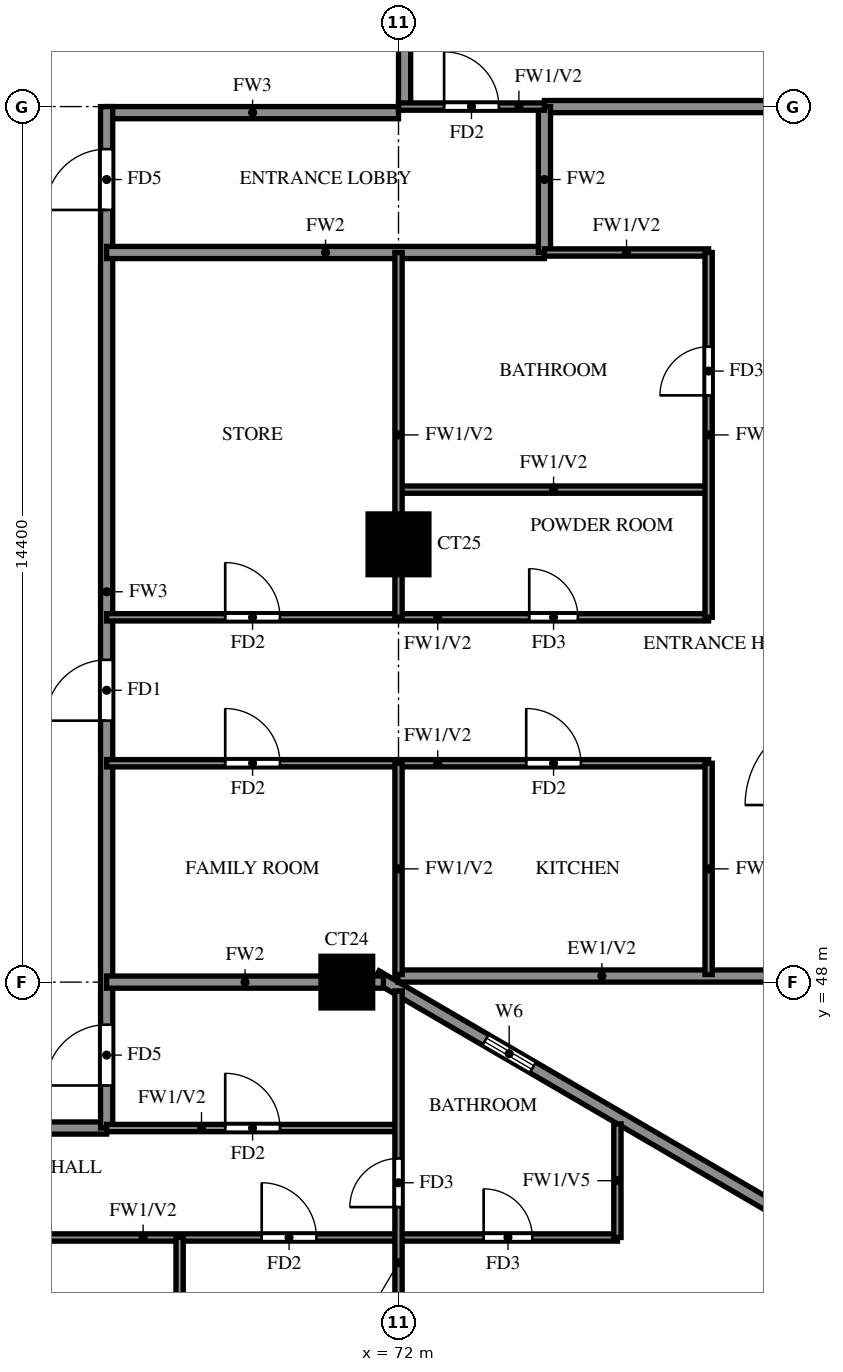
"""IFC4 building model, lengths in metres.
Left out: names, types, materials, properties, quantities, classifications, styles, units other than length and angle.
Written with IfcOpenShell. Run it as: python <this file> out.ifc"""

import sys

from ifc_helpers import new_model, si_unit, direction, frame, frame_2d, origin, origin_2d, place, context, subcontext, project, spatial, rectangle, extrude, source, transform, mapped, element, fill, save


model = new_model("IFC4")
c1 = context("Model", 3, precision=1e-05, world=origin(), true_north=direction((0.0, 1.0)))
c2 = subcontext(c1, "Body", "Model", "MODEL_VIEW")
j1 = project(units=[si_unit("LENGTHUNIT", "METRE"), si_unit("PLANEANGLEUNIT", "RADIAN")], contexts=[c1])
p1 = place(None, origin())
s1 = spatial("IfcSite", under=j1, at=p1, CompositionType="ELEMENT")
p2 = place(p1, origin())
s2 = spatial("IfcBuilding", under=s1, at=p2, CompositionType="ELEMENT")
p3 = place(p2, frame((0.0, 0.0, 171.0)))
s3 = spatial("IfcBuildingStorey", under=s2, at=p3, CompositionType="ELEMENT", Elevation=171.0)
m1 = source(origin(), c2, "Body", "SweptSolid", [
    extrude(rectangle(XDim=0.85, YDim=0.85, at=origin_2d()), origin(), (0.0, 0.0, 1.0), 3.2),
])
p4 = place(p3, frame((71.15, 48.0, 0.0), z_axis=(0.0, 0.0, 1.0), x_axis=(1.0, 0.0, 0.0)))
e1 = element("IfcColumn", 1, at=p4, inside=s3, PredefinedType="COLUMN", context=c2, shape_type="MappedRepresentation", body=[
    mapped(m1, transform((0.0, 0.0, 0.0))),
])
m2 = source(origin(), c2, "Body", "SweptSolid", [
    extrude(rectangle(XDim=1.0, YDim=1.0, at=origin_2d()), origin(), (0.0, 0.0, 1.0), 3.2),
])
p5 = place(p3, frame((72.0, 55.2, 0.0), z_axis=(0.0, 0.0, 1.0), x_axis=(1.0, 0.0, 0.0)))
e2 = element("IfcColumn", 2, at=p5, inside=s3, PredefinedType="COLUMN", context=c2, shape_type="MappedRepresentation", body=[
    mapped(m2, transform((0.0, 0.0, 0.0))),
])
p6 = place(p3, frame((85.719, 39.881, 0.0), z_axis=(0.0, 0.0, 1.0), x_axis=(-0.86377618652, 0.503875678716, 0.0)))
e3 = element("IfcWall", 3, at=p6, inside=s3, PredefinedType="SOLIDWALL", context=c2, shape_type="SweptSolid", body=[
    extrude(rectangle(XDim=16.311, YDim=0.2, at=frame_2d((8.156, 0.0))), origin(), (0.0, 0.0, 1.0), 3.2),
])
p7 = place(p6, frame((13.326, 0.0, 1.5)))
e4 = element("IfcOpeningElement", 4, at=p7, cuts=e3, PredefinedType="OPENING", context=c2, shape_type="SweptSolid", body=[
    extrude(rectangle(XDim=0.9, YDim=0.9, at=frame_2d((0.45, 0.45))), frame((0.0, 0.11, 0.0), z_axis=(0.0, -1.0, 0.0), x_axis=(1.0, 0.0, 0.0)), (0.0, 0.0, 1.0), 0.22),
])
p8 = place(p3, frame((71.99, 48.1, 0.0), z_axis=(0.0, 0.0, 1.0), x_axis=(1.0, 0.0, 0.0)))
e5 = element("IfcWall", 5, at=p8, inside=s3, PredefinedType="SOLIDWALL", context=c2, shape_type="SweptSolid", body=[
    extrude(rectangle(XDim=6.71, YDim=0.2, at=frame_2d((3.355, 0.0))), origin(), (0.0, 0.0, 1.0), 3.2),
])
p9 = place(p3, frame((60.0, 45.6, 0.0), z_axis=(0.0, 0.0, 1.0), x_axis=(1.0, 0.0, 0.0)))
e6 = element("IfcWall", 6, at=p9, inside=s3, PredefinedType="SOLIDWALL", context=c2, shape_type="SweptSolid", body=[
    extrude(rectangle(XDim=7.2, YDim=0.2, at=frame_2d((3.6, 0.0))), origin(), (0.0, 0.0, 1.0), 3.2),
])
p10 = place(p3, frame((67.2, 62.3, 0.0), z_axis=(0.0, 0.0, 1.0), x_axis=(1.0, 0.0, 0.0)))
e7 = element("IfcWall", 7, at=p10, inside=s3, PredefinedType="SOLIDWALL", context=c2, shape_type="SweptSolid", body=[
    extrude(rectangle(XDim=4.8, YDim=0.2, at=frame_2d((2.4, 0.0))), origin(), (0.0, 0.0, 1.0), 3.2),
])
p11 = place(p3, frame((67.2, 45.6, 0.0), z_axis=(0.0, 0.0, 1.0), x_axis=(0.0, 1.0, 0.0)))
e8 = element("IfcWall", 8, at=p11, inside=s3, PredefinedType="SOLIDWALL", context=c2, shape_type="SweptSolid", body=[
    extrude(rectangle(XDim=16.8, YDim=0.2, at=frame_2d((8.4, 0.0))), origin(), (0.0, 0.0, 1.0), 3.2),
])
p12 = place(p11, frame((6.7, 0.0, 0.0)))
e9 = element("IfcOpeningElement", 9, at=p12, cuts=e8, PredefinedType="OPENING", context=c2, shape_type="SweptSolid", body=[
    extrude(rectangle(XDim=1.0, YDim=2.1, at=frame_2d((0.5, 1.05))), frame((0.0, 0.11, 0.0), z_axis=(0.0, -1.0, 0.0), x_axis=(1.0, 0.0, 0.0)), (0.0, 0.0, 1.0), 0.22),
])
p13 = place(p11, frame((15.1, 0.0, 0.0)))
e10 = element("IfcOpeningElement", 10, at=p13, cuts=e8, PredefinedType="OPENING", context=c2, shape_type="SweptSolid", body=[
    extrude(rectangle(XDim=1.0, YDim=2.1, at=frame_2d((0.5, 1.05))), frame((0.0, 0.11, 0.0), z_axis=(0.0, -1.0, 0.0), x_axis=(1.0, 0.0, 0.0)), (0.0, 0.0, 1.0), 0.22),
])
p14 = place(p11, frame((0.7, 0.0, 0.0)))
e11 = element("IfcOpeningElement", 11, at=p14, cuts=e8, PredefinedType="OPENING", context=c2, shape_type="SweptSolid", body=[
    extrude(rectangle(XDim=1.0, YDim=2.1, at=frame_2d((0.5, 1.05))), frame((0.0, 0.11, 0.0), z_axis=(0.0, -1.0, 0.0), x_axis=(1.0, 0.0, 0.0)), (0.0, 0.0, 1.0), 0.22),
])
p15 = place(p3, frame((72.1, 62.4, 0.0), z_axis=(0.0, 0.0, 1.0), x_axis=(0.0, 1.0, 0.0)))
e12 = element("IfcWall", 12, at=p15, inside=s3, PredefinedType="SOLIDWALL", context=c2, shape_type="SweptSolid", body=[
    extrude(rectangle(XDim=15.6, YDim=0.2, at=frame_2d((7.8, 0.0))), origin(), (0.0, 0.0, 1.0), 3.2),
])
p16 = place(p3, frame((67.2, 48.0, 0.0), z_axis=(0.0, 0.0, 1.0), x_axis=(1.0, 0.0, 0.0)))
e13 = element("IfcWall", 13, at=p16, inside=s3, PredefinedType="SOLIDWALL", context=c2, shape_type="SweptSolid", body=[
    extrude(rectangle(XDim=4.552, YDim=0.2, at=frame_2d((2.276, 0.0))), origin(), (0.0, 0.0, 1.0), 3.2),
])
p17 = place(p3, frame((67.2, 60.0, 0.0), z_axis=(0.0, 0.0, 1.0), x_axis=(1.0, 0.0, 0.0)))
e14 = element("IfcWall", 14, at=p17, inside=s3, PredefinedType="SOLIDWALL", context=c2, shape_type="SweptSolid", body=[
    extrude(rectangle(XDim=7.2, YDim=0.2, at=frame_2d((3.6, 0.0))), origin(), (0.0, 0.0, 1.0), 3.2),
])
p18 = place(p3, frame((74.4, 62.4, 0.0), z_axis=(0.0, 0.0, 1.0), x_axis=(1.0, 0.0, 0.0)))
e15 = element("IfcWall", 15, at=p18, inside=s3, PredefinedType="SOLIDWALL", context=c2, shape_type="SweptSolid", body=[
    extrude(rectangle(XDim=11.875, YDim=0.2, at=frame_2d((5.938, 0.0))), origin(), (0.0, 0.0, 1.0), 3.2),
])
p19 = place(p3, frame((74.4, 60.0, 0.0), z_axis=(0.0, 0.0, 1.0), x_axis=(0.0, 1.0, 0.0)))
e16 = element("IfcWall", 16, at=p19, inside=s3, PredefinedType="SOLIDWALL", context=c2, shape_type="SweptSolid", body=[
    extrude(rectangle(XDim=2.4, YDim=0.2, at=frame_2d((1.2, 0.0))), origin(), (0.0, 0.0, 1.0), 3.2),
])
p20 = place(p3, frame((60.0, 43.8, 0.0), z_axis=(0.0, 0.0, 1.0), x_axis=(1.0, 0.0, 0.0)))
e17 = element("IfcWall", 17, at=p20, inside=s3, PredefinedType="PARTITIONING", context=c2, shape_type="SweptSolid", body=[
    extrude(rectangle(XDim=15.6, YDim=0.12, at=frame_2d((7.8, 0.0))), origin(), (0.0, 0.0, 1.0), 3.2),
])
p21 = place(p20, frame((9.75, 0.0, 0.0)))
e18 = element("IfcOpeningElement", 18, at=p21, cuts=e17, PredefinedType="OPENING", context=c2, shape_type="SweptSolid", body=[
    extrude(rectangle(XDim=0.9, YDim=2.1, at=frame_2d((0.45, 1.05))), frame((0.0, 0.07, 0.0), z_axis=(0.0, -1.0, 0.0), x_axis=(1.0, 0.0, 0.0)), (0.0, 0.0, 1.0), 0.14),
])
p22 = place(p20, frame((3.45, 0.0, 0.0)))
e19 = element("IfcOpeningElement", 19, at=p22, cuts=e17, PredefinedType="OPENING", context=c2, shape_type="SweptSolid", body=[
    extrude(rectangle(XDim=1.5, YDim=2.1, at=frame_2d((0.75, 1.05))), frame((0.0, 0.07, 0.0), z_axis=(0.0, -1.0, 0.0), x_axis=(1.0, 0.0, 0.0)), (0.0, 0.0, 1.0), 0.14),
])
p23 = place(p20, frame((13.4, 0.0, 0.0)))
e20 = element("IfcOpeningElement", 20, at=p23, cuts=e17, PredefinedType="OPENING", context=c2, shape_type="SweptSolid", body=[
    extrude(rectangle(XDim=0.8, YDim=2.1, at=frame_2d((0.4, 1.05))), frame((0.0, 0.07, 0.0), z_axis=(0.0, -1.0, 0.0), x_axis=(1.0, 0.0, 0.0)), (0.0, 0.0, 1.0), 0.14),
])
p24 = place(p3, frame((67.2, 45.6, 0.0), z_axis=(0.0, 0.0, 1.0), x_axis=(1.0, 0.0, 0.0)))
e21 = element("IfcWall", 21, at=p24, inside=s3, PredefinedType="PARTITIONING", context=c2, shape_type="SweptSolid", body=[
    extrude(rectangle(XDim=4.8, YDim=0.12, at=frame_2d((2.4, 0.0))), origin(), (0.0, 0.0, 1.0), 3.2),
])
p25 = place(p24, frame((1.95, 0.0, 0.0)))
e22 = element("IfcOpeningElement", 22, at=p25, cuts=e21, PredefinedType="OPENING", context=c2, shape_type="SweptSolid", body=[
    extrude(rectangle(XDim=0.9, YDim=2.1, at=frame_2d((0.45, 1.05))), frame((0.0, 0.07, 0.0), z_axis=(0.0, -1.0, 0.0), x_axis=(1.0, 0.0, 0.0)), (0.0, 0.0, 1.0), 0.14),
])
p26 = place(p3, frame((67.2, 51.6, 0.0), z_axis=(0.0, 0.0, 1.0), x_axis=(1.0, 0.0, 0.0)))
e23 = element("IfcWall", 23, at=p26, inside=s3, PredefinedType="PARTITIONING", context=c2, shape_type="SweptSolid", body=[
    extrude(rectangle(XDim=9.9, YDim=0.12, at=frame_2d((4.95, 0.0))), origin(), (0.0, 0.0, 1.0), 3.2),
])
p27 = place(p26, frame((6.9, 0.0, 0.0)))
e24 = element("IfcOpeningElement", 24, at=p27, cuts=e23, PredefinedType="OPENING", context=c2, shape_type="SweptSolid", body=[
    extrude(rectangle(XDim=0.9, YDim=2.1, at=frame_2d((0.45, 1.05))), frame((0.0, 0.07, 0.0), z_axis=(0.0, -1.0, 0.0), x_axis=(1.0, 0.0, 0.0)), (0.0, 0.0, 1.0), 0.14),
])
p28 = place(p26, frame((1.95, 0.0, 0.0)))
e25 = element("IfcOpeningElement", 25, at=p28, cuts=e23, PredefinedType="OPENING", context=c2, shape_type="SweptSolid", body=[
    extrude(rectangle(XDim=0.9, YDim=2.1, at=frame_2d((0.45, 1.05))), frame((0.0, 0.07, 0.0), z_axis=(0.0, -1.0, 0.0), x_axis=(1.0, 0.0, 0.0)), (0.0, 0.0, 1.0), 0.14),
])
p29 = place(p3, frame((67.2, 54.0, 0.0), z_axis=(0.0, 0.0, 1.0), x_axis=(1.0, 0.0, 0.0)))
e26 = element("IfcWall", 26, at=p29, inside=s3, PredefinedType="PARTITIONING", context=c2, shape_type="SweptSolid", body=[
    extrude(rectangle(XDim=9.9, YDim=0.12, at=frame_2d((4.95, 0.0))), origin(), (0.0, 0.0, 1.0), 3.2),
])
p30 = place(p29, frame((6.95, 0.0, 0.0)))
e27 = element("IfcOpeningElement", 27, at=p30, cuts=e26, PredefinedType="OPENING", context=c2, shape_type="SweptSolid", body=[
    extrude(rectangle(XDim=0.8, YDim=2.1, at=frame_2d((0.4, 1.05))), frame((0.0, 0.07, 0.0), z_axis=(0.0, -1.0, 0.0), x_axis=(1.0, 0.0, 0.0)), (0.0, 0.0, 1.0), 0.14),
])
p31 = place(p29, frame((1.95, 0.0, 0.0)))
e28 = element("IfcOpeningElement", 28, at=p31, cuts=e26, PredefinedType="OPENING", context=c2, shape_type="SweptSolid", body=[
    extrude(rectangle(XDim=0.9, YDim=2.1, at=frame_2d((0.45, 1.05))), frame((0.0, 0.07, 0.0), z_axis=(0.0, -1.0, 0.0), x_axis=(1.0, 0.0, 0.0)), (0.0, 0.0, 1.0), 0.14),
])
p32 = place(p3, frame((72.0, 56.1, 0.0), z_axis=(0.0, 0.0, 1.0), x_axis=(1.0, 0.0, 0.0)))
e29 = element("IfcWall", 29, at=p32, inside=s3, PredefinedType="PARTITIONING", context=c2, shape_type="SweptSolid", body=[
    extrude(rectangle(XDim=5.1, YDim=0.12, at=frame_2d((2.55, 0.0))), origin(), (0.0, 0.0, 1.0), 3.2),
])
p33 = place(p3, frame((74.4, 60.0, 0.0), z_axis=(0.0, 0.0, 1.0), x_axis=(1.0, 0.0, 0.0)))
e30 = element("IfcWall", 30, at=p33, inside=s3, PredefinedType="PARTITIONING", context=c2, shape_type="SweptSolid", body=[
    extrude(rectangle(XDim=2.7, YDim=0.12, at=frame_2d((1.35, 0.0))), origin(), (0.0, 0.0, 1.0), 3.2),
])
p34 = place(p3, frame((72.0, 62.4, 0.0), z_axis=(0.0, 0.0, 1.0), x_axis=(1.0, 0.0, 0.0)))
e31 = element("IfcWall", 31, at=p34, inside=s3, PredefinedType="PARTITIONING", context=c2, shape_type="SweptSolid", body=[
    extrude(rectangle(XDim=2.4, YDim=0.12, at=frame_2d((1.2, 0.0))), origin(), (0.0, 0.0, 1.0), 3.2),
])
p35 = place(p34, frame((0.75, 0.0, 0.0)))
e32 = element("IfcOpeningElement", 32, at=p35, cuts=e31, PredefinedType="OPENING", context=c2, shape_type="SweptSolid", body=[
    extrude(rectangle(XDim=0.9, YDim=2.1, at=frame_2d((0.45, 1.05))), frame((0.0, 0.07, 0.0), z_axis=(0.0, -1.0, 0.0), x_axis=(1.0, 0.0, 0.0)), (0.0, 0.0, 1.0), 0.14),
])
p36 = place(p3, frame((68.4, 39.725, 0.0), z_axis=(0.0, 0.0, 1.0), x_axis=(0.0, 1.0, 0.0)))
e33 = element("IfcWall", 33, at=p36, inside=s3, PredefinedType="PARTITIONING", context=c2, shape_type="SweptSolid", body=[
    extrude(rectangle(XDim=4.075, YDim=0.12, at=frame_2d((2.038, 0.0))), origin(), (0.0, 0.0, 1.0), 3.2),
])
p37 = place(p36, frame((1.288, 0.0, 0.0)))
e34 = element("IfcOpeningElement", 34, at=p37, cuts=e33, PredefinedType="OPENING", context=c2, shape_type="SweptSolid", body=[
    extrude(rectangle(XDim=1.5, YDim=2.1, at=frame_2d((0.75, 1.05))), frame((0.0, 0.07, 0.0), z_axis=(0.0, -1.0, 0.0), x_axis=(1.0, 0.0, 0.0)), (0.0, 0.0, 1.0), 0.14),
])
p38 = place(p3, frame((72.0, 39.725, 0.0), z_axis=(0.0, 0.0, 1.0), x_axis=(0.0, 1.0, 0.0)))
e35 = element("IfcWall", 35, at=p38, inside=s3, PredefinedType="PARTITIONING", context=c2, shape_type="SweptSolid", body=[
    extrude(rectangle(XDim=8.13, YDim=0.12, at=frame_2d((4.065, 0.0))), origin(), (0.0, 0.0, 1.0), 2.3),
])
p39 = place(p38, frame((1.788, 0.0, 0.0)))
e36 = element("IfcOpeningElement", 36, at=p39, cuts=e35, PredefinedType="OPENING", context=c2, shape_type="SweptSolid", body=[
    extrude(rectangle(XDim=0.9, YDim=2.1, at=frame_2d((0.45, 1.05))), frame((0.0, 0.07, 0.0), z_axis=(0.0, -1.0, 0.0), x_axis=(1.0, 0.0, 0.0)), (0.0, 0.0, 1.0), 0.14),
])
p40 = place(p38, frame((4.575, 0.0, 0.0)))
e37 = element("IfcOpeningElement", 37, at=p40, cuts=e35, PredefinedType="OPENING", context=c2, shape_type="SweptSolid", body=[
    extrude(rectangle(XDim=0.8, YDim=2.1, at=frame_2d((0.4, 1.05))), frame((0.0, 0.07, 0.0), z_axis=(0.0, -1.0, 0.0), x_axis=(1.0, 0.0, 0.0)), (0.0, 0.0, 1.0), 0.14),
])
p41 = place(p3, frame((72.0, 48.125, 0.0), z_axis=(0.0, 0.0, 1.0), x_axis=(0.0, 1.0, 0.0)))
e38 = element("IfcWall", 38, at=p41, inside=s3, PredefinedType="PARTITIONING", context=c2, shape_type="SweptSolid", body=[
    extrude(rectangle(XDim=3.475, YDim=0.12, at=frame_2d((1.738, 0.0))), origin(), (0.0, 0.0, 1.0), 3.2),
])
p42 = place(p3, frame((72.0, 54.0, 0.0), z_axis=(0.0, 0.0, 1.0), x_axis=(0.0, 1.0, 0.0)))
e39 = element("IfcWall", 39, at=p42, inside=s3, PredefinedType="PARTITIONING", context=c2, shape_type="SweptSolid", body=[
    extrude(rectangle(XDim=6.0, YDim=0.12, at=frame_2d((3.0, 0.0))), origin(), (0.0, 0.0, 1.0), 3.2),
])
p43 = place(p3, frame((75.6, 43.8, 0.0), z_axis=(0.0, 0.0, 1.0), x_axis=(0.0, 1.0, 0.0)))
e40 = element("IfcWall", 40, at=p43, inside=s3, PredefinedType="PARTITIONING", context=c2, shape_type="SweptSolid", body=[
    extrude(rectangle(XDim=1.868, YDim=0.12, at=frame_2d((0.934, 0.0))), origin(), (0.0, 0.0, 1.0), 2.3),
])
p44 = place(p3, frame((77.1, 48.125, 0.0), z_axis=(0.0, 0.0, 1.0), x_axis=(0.0, 1.0, 0.0)))
e41 = element("IfcWall", 41, at=p44, inside=s3, PredefinedType="PARTITIONING", context=c2, shape_type="SweptSolid", body=[
    extrude(rectangle(XDim=3.475, YDim=0.12, at=frame_2d((1.738, 0.0))), origin(), (0.0, 0.0, 1.0), 3.2),
])
p45 = place(p3, frame((77.1, 54.0, 0.0), z_axis=(0.0, 0.0, 1.0), x_axis=(0.0, 1.0, 0.0)))
e42 = element("IfcWall", 42, at=p45, inside=s3, PredefinedType="PARTITIONING", context=c2, shape_type="SweptSolid", body=[
    extrude(rectangle(XDim=6.0, YDim=0.12, at=frame_2d((3.0, 0.0))), origin(), (0.0, 0.0, 1.0), 3.2),
])
p46 = place(p45, frame((3.65, 0.0, 0.0)))
e43 = element("IfcOpeningElement", 43, at=p46, cuts=e42, PredefinedType="OPENING", context=c2, shape_type="SweptSolid", body=[
    extrude(rectangle(XDim=0.8, YDim=2.1, at=frame_2d((0.4, 1.05))), frame((0.0, 0.07, 0.0), z_axis=(0.0, -1.0, 0.0), x_axis=(1.0, 0.0, 0.0)), (0.0, 0.0, 1.0), 0.14),
])
p47 = place(p7, origin())
e44 = element("IfcWindow", 44, at=p47, inside=s3, PartitioningType="SINGLE_PANEL", PredefinedType="WINDOW", context=c2, shape_type="SweptSolid", body=[
    extrude(rectangle(XDim=0.9, YDim=0.9, at=frame_2d((0.45, 0.45))), frame((0.0, 0.03, 0.0), z_axis=(0.0, -1.0, 0.0), x_axis=(1.0, 0.0, 0.0)), (0.0, 0.0, 1.0), 0.06),
])
fill(e4, e44)
p48 = place(p12, origin())
e45 = element("IfcDoor", 45, at=p48, inside=s3, OperationType="SINGLE_SWING_RIGHT", PredefinedType="DOOR", context=c2, shape_type="SweptSolid", body=[
    extrude(rectangle(XDim=1.0, YDim=2.1, at=frame_2d((0.5, 1.05))), frame((0.0, 0.025, 0.0), z_axis=(0.0, -1.0, 0.0), x_axis=(1.0, 0.0, 0.0)), (0.0, 0.0, 1.0), 0.05),
])
fill(e9, e45)
p49 = place(p27, origin())
e46 = element("IfcDoor", 46, at=p49, inside=s3, OperationType="SINGLE_SWING_LEFT", PredefinedType="DOOR", context=c2, shape_type="SweptSolid", body=[
    extrude(rectangle(XDim=0.9, YDim=2.1, at=frame_2d((0.45, 1.05))), frame((0.0, 0.025, 0.0), z_axis=(0.0, -1.0, 0.0), x_axis=(1.0, 0.0, 0.0)), (0.0, 0.0, 1.0), 0.05),
])
fill(e24, e46)
p50 = place(p30, origin())
e47 = element("IfcDoor", 47, at=p50, inside=s3, OperationType="SINGLE_SWING_LEFT", PredefinedType="DOOR", context=c2, shape_type="SweptSolid", body=[
    extrude(rectangle(XDim=0.8, YDim=2.1, at=frame_2d((0.4, 1.05))), frame((0.0, 0.025, 0.0), z_axis=(0.0, -1.0, 0.0), x_axis=(1.0, 0.0, 0.0)), (0.0, 0.0, 1.0), 0.05),
])
fill(e27, e47)
p51 = place(p46, origin())
e48 = element("IfcDoor", 48, at=p51, inside=s3, OperationType="SINGLE_SWING_RIGHT", PredefinedType="DOOR", context=c2, shape_type="SweptSolid", body=[
    extrude(rectangle(XDim=0.8, YDim=2.1, at=frame_2d((0.4, 1.05))), frame((0.0, 0.025, 0.0), z_axis=(0.0, -1.0, 0.0), x_axis=(1.0, 0.0, 0.0)), (0.0, 0.0, 1.0), 0.05),
])
fill(e43, e48)
p52 = place(p28, origin())
e49 = element("IfcDoor", 49, at=p52, inside=s3, OperationType="SINGLE_SWING_LEFT", PredefinedType="DOOR", context=c2, shape_type="SweptSolid", body=[
    extrude(rectangle(XDim=0.9, YDim=2.1, at=frame_2d((0.45, 1.05))), frame((0.0, 0.025, 0.0), z_axis=(0.0, -1.0, 0.0), x_axis=(1.0, 0.0, 0.0)), (0.0, 0.0, 1.0), 0.05),
])
fill(e25, e49)
p53 = place(p31, origin())
e50 = element("IfcDoor", 50, at=p53, inside=s3, OperationType="SINGLE_SWING_LEFT", PredefinedType="DOOR", context=c2, shape_type="SweptSolid", body=[
    extrude(rectangle(XDim=0.9, YDim=2.1, at=frame_2d((0.45, 1.05))), frame((0.0, 0.025, 0.0), z_axis=(0.0, -1.0, 0.0), x_axis=(1.0, 0.0, 0.0)), (0.0, 0.0, 1.0), 0.05),
])
fill(e28, e50)
p54 = place(p35, origin())
e51 = element("IfcDoor", 51, at=p54, inside=s3, OperationType="SINGLE_SWING_LEFT", PredefinedType="DOOR", context=c2, shape_type="SweptSolid", body=[
    extrude(rectangle(XDim=0.9, YDim=2.1, at=frame_2d((0.45, 1.05))), frame((0.0, 0.025, 0.0), z_axis=(0.0, -1.0, 0.0), x_axis=(1.0, 0.0, 0.0)), (0.0, 0.0, 1.0), 0.05),
])
fill(e32, e51)
p55 = place(p13, origin())
e52 = element("IfcDoor", 52, at=p55, inside=s3, OperationType="SINGLE_SWING_RIGHT", PredefinedType="DOOR", context=c2, shape_type="SweptSolid", body=[
    extrude(rectangle(XDim=1.0, YDim=2.1, at=frame_2d((0.5, 1.05))), frame((0.0, 0.025, 0.0), z_axis=(0.0, -1.0, 0.0), x_axis=(1.0, 0.0, 0.0)), (0.0, 0.0, 1.0), 0.05),
])
fill(e10, e52)
p56 = place(p25, origin())
e53 = element("IfcDoor", 53, at=p56, inside=s3, OperationType="SINGLE_SWING_LEFT", PredefinedType="DOOR", context=c2, shape_type="SweptSolid", body=[
    extrude(rectangle(XDim=0.9, YDim=2.1, at=frame_2d((0.45, 1.05))), frame((0.0, 0.025, 0.0), z_axis=(0.0, -1.0, 0.0), x_axis=(1.0, 0.0, 0.0)), (0.0, 0.0, 1.0), 0.05),
])
fill(e22, e53)
p57 = place(p14, origin())
e54 = element("IfcDoor", 54, at=p57, inside=s3, OperationType="SINGLE_SWING_RIGHT", PredefinedType="DOOR", context=c2, shape_type="SweptSolid", body=[
    extrude(rectangle(XDim=1.0, YDim=2.1, at=frame_2d((0.5, 1.05))), frame((0.0, 0.025, 0.0), z_axis=(0.0, -1.0, 0.0), x_axis=(1.0, 0.0, 0.0)), (0.0, 0.0, 1.0), 0.05),
])
fill(e11, e54)
p58 = place(p21, origin())
e55 = element("IfcDoor", 55, at=p58, inside=s3, OperationType="SINGLE_SWING_LEFT", PredefinedType="DOOR", context=c2, shape_type="SweptSolid", body=[
    extrude(rectangle(XDim=0.9, YDim=2.1, at=frame_2d((0.45, 1.05))), frame((0.0, 0.025, 0.0), z_axis=(0.0, -1.0, 0.0), x_axis=(1.0, 0.0, 0.0)), (0.0, 0.0, 1.0), 0.05),
])
fill(e18, e55)
p59 = place(p40, origin())
e56 = element("IfcDoor", 56, at=p59, inside=s3, OperationType="SINGLE_SWING_LEFT", PredefinedType="DOOR", context=c2, shape_type="SweptSolid", body=[
    extrude(rectangle(XDim=0.8, YDim=2.1, at=frame_2d((0.4, 1.05))), frame((0.0, 0.025, 0.0), z_axis=(0.0, -1.0, 0.0), x_axis=(1.0, 0.0, 0.0)), (0.0, 0.0, 1.0), 0.05),
])
fill(e37, e56)
p60 = place(p23, origin())
e57 = element("IfcDoor", 57, at=p60, inside=s3, OperationType="SINGLE_SWING_LEFT", PredefinedType="DOOR", context=c2, shape_type="SweptSolid", body=[
    extrude(rectangle(XDim=0.8, YDim=2.1, at=frame_2d((0.4, 1.05))), frame((0.0, 0.025, 0.0), z_axis=(0.0, -1.0, 0.0), x_axis=(1.0, 0.0, 0.0)), (0.0, 0.0, 1.0), 0.05),
])
fill(e20, e57)
save(model, sys.argv[1])
